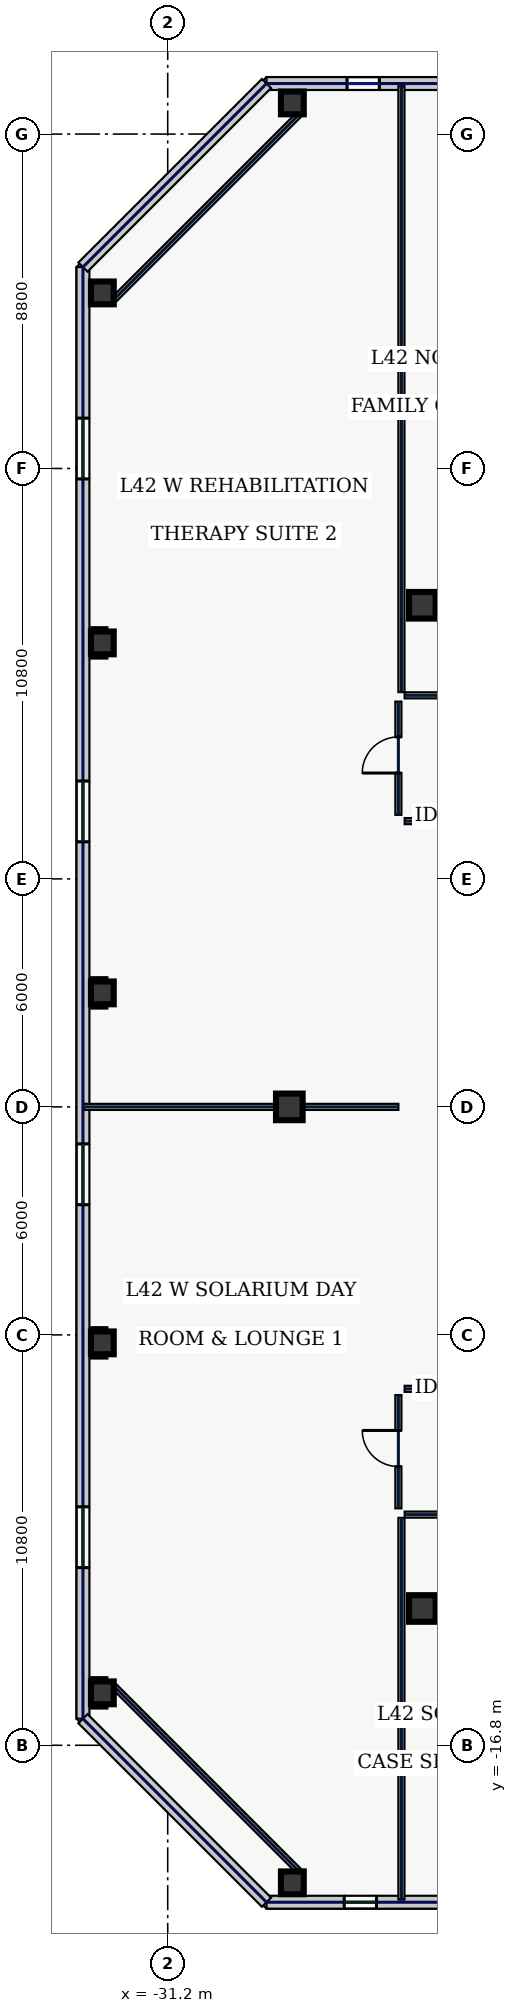
"""IFC4 building model, lengths in metres.
Left out: names, types, materials, properties, quantities, classifications, styles, units other than length and angle.
Written with IfcOpenShell. Run it as: python <this file> out.ifc"""

import sys

from ifc_helpers import new_model, si_unit, direction, frame, frame_2d, origin, origin_2d, place, context, subcontext, project, spatial, rectangle, hollow_rectangle, extrude, element, fill, save


model = new_model("IFC4")
c1 = context("Model", 3, precision=1e-05, world=origin(), true_north=direction((0.0, 1.0)))
c2 = subcontext(c1, "Body", "Model", "MODEL_VIEW")
j1 = project(units=[si_unit("LENGTHUNIT", "METRE"), si_unit("PLANEANGLEUNIT", "RADIAN")], contexts=[c1])
p1 = place(None, origin())
s1 = spatial("IfcSite", under=j1, at=p1, CompositionType="ELEMENT")
p2 = place(p1, origin())
s2 = spatial("IfcBuilding", under=s1, at=p2, CompositionType="ELEMENT")
p3 = place(p2, frame((0.0, 0.0, 184.2)))
s3 = spatial("IfcBuildingStorey", under=s2, at=p3, CompositionType="ELEMENT", Elevation=184.2)
for number, where, z_axis, x_axis in (
    (1, (-24.5, -13.2, 0.0), (0.0, 0.0, 1.0), (1.0, 0.0, 0.0)),
    (2, (-24.5, 13.2, 0.0), (0.0, 0.0, 1.0), (1.0, 0.0, 0.0)),
    (3, (-28.0, 0.0, 0.0), (0.0, 0.0, 1.0), (1.0, 0.0, 0.0)),
):
    element("IfcColumn", number, at=place(p3, frame(where, z_axis=z_axis, x_axis=x_axis)), inside=s3, PredefinedType="COLUMN", context=c2, shape_type="SweptSolid", body=[
        extrude(hollow_rectangle(XDim=0.7, YDim=0.7, WallThickness=0.032, at=origin_2d()), origin(), (0.0, 0.0, 1.0), 3.74),
    ])
for number, where, z_axis, x_axis in (
    (4, (-27.92, -20.42, 0.0), (0.0, 0.0, 1.0), (1.0, 0.0, 0.0)),
    (5, (-27.92, 26.42, 0.0), (0.0, 0.0, 1.0), (1.0, 0.0, 0.0)),
    (6, (-32.92, 21.42, 0.0), (0.0, 0.0, 1.0), (1.0, 0.0, 0.0)),
    (7, (-32.92, 12.21, 0.0), (0.0, 0.0, 1.0), (1.0, 0.0, 0.0)),
    (8, (-32.92, 3.0, 0.0), (0.0, 0.0, 1.0), (1.0, 0.0, 0.0)),
    (9, (-32.92, -6.21, 0.0), (0.0, 0.0, 1.0), (1.0, 0.0, 0.0)),
    (10, (-32.92, -15.42, 0.0), (0.0, 0.0, 1.0), (1.0, 0.0, 0.0)),
):
    element("IfcColumn", number, at=place(p3, frame(where, z_axis=z_axis, x_axis=x_axis)), inside=s3, PredefinedType="COLUMN", context=c2, shape_type="SweptSolid", body=[
        extrude(hollow_rectangle(XDim=0.6, YDim=0.6, WallThickness=0.028, at=origin_2d()), origin(), (0.0, 0.0, 1.0), 3.74),
    ])
p4 = place(p3, frame((-28.6, -20.93, 0.0), z_axis=(0.0, 0.0, 1.0), x_axis=(1.0, 0.0, 0.0)))
e11 = element("IfcWall", 11, at=p4, inside=s3, PredefinedType="STANDARD", context=c2, shape_type="SweptSolid", body=[
    extrude(rectangle(XDim=19.937, YDim=0.34, at=frame_2d((9.969, 0.0))), origin(), (0.0, 0.0, 1.0), 3.74),
])
p5 = place(p4, frame((2.044, 0.0, 0.8)))
e12 = element("IfcOpeningElement", 12, at=p5, cuts=e11, PredefinedType="OPENING", context=c2, shape_type="SweptSolid", body=[
    extrude(rectangle(XDim=0.85, YDim=1.85, at=frame_2d((0.425, 0.925))), frame((0.0, 0.18, 0.0), z_axis=(0.0, -1.0, 0.0), x_axis=(1.0, 0.0, 0.0)), (0.0, 0.0, 1.0), 0.36),
])
p6 = place(p4, frame((6.029, 0.0, 0.8)))
e13 = element("IfcOpeningElement", 13, at=p6, cuts=e11, PredefinedType="OPENING", context=c2, shape_type="SweptSolid", body=[
    extrude(rectangle(XDim=0.85, YDim=1.85, at=frame_2d((0.425, 0.925))), frame((0.0, 0.18, 0.0), z_axis=(0.0, -1.0, 0.0), x_axis=(1.0, 0.0, 0.0)), (0.0, 0.0, 1.0), 0.36),
])
p7 = place(p4, frame((10.707, 0.0, 0.8)))
e14 = element("IfcOpeningElement", 14, at=p7, cuts=e11, PredefinedType="OPENING", context=c2, shape_type="SweptSolid", body=[
    extrude(rectangle(XDim=1.95, YDim=2.1, at=frame_2d((0.975, 1.05))), frame((0.0, 0.18, 0.0), z_axis=(0.0, -1.0, 0.0), x_axis=(1.0, 0.0, 0.0)), (0.0, 0.0, 1.0), 0.36),
])
p8 = place(p4, frame((14.867, 0.0, 0.22)))
e15 = element("IfcOpeningElement", 15, at=p8, cuts=e11, PredefinedType="OPENING", context=c2, shape_type="SweptSolid", body=[
    extrude(rectangle(XDim=1.6, YDim=1.2, at=frame_2d((0.8, 0.6))), frame((0.0, 0.18, 0.0), z_axis=(0.0, -1.0, 0.0), x_axis=(1.0, 0.0, 0.0)), (0.0, 0.0, 1.0), 0.36),
])
p9 = place(p3, frame((-8.663, 26.93, 0.0), z_axis=(0.0, 0.0, 1.0), x_axis=(-1.0, 0.0, 0.0)))
e16 = element("IfcWall", 16, at=p9, inside=s3, PredefinedType="STANDARD", context=c2, shape_type="SweptSolid", body=[
    extrude(rectangle(XDim=19.937, YDim=0.34, at=frame_2d((9.969, 0.0))), origin(), (0.0, 0.0, 1.0), 3.74),
])
p10 = place(p9, frame((16.968, 0.0, 0.7)))
e17 = element("IfcOpeningElement", 17, at=p10, cuts=e16, PredefinedType="OPENING", context=c2, shape_type="SweptSolid", body=[
    extrude(rectangle(XDim=0.85, YDim=1.85, at=frame_2d((0.425, 0.925))), frame((0.0, 0.18, 0.0), z_axis=(0.0, -1.0, 0.0), x_axis=(1.0, 0.0, 0.0)), (0.0, 0.0, 1.0), 0.36),
])
p11 = place(p9, frame((12.983, 0.0, 0.7)))
e18 = element("IfcOpeningElement", 18, at=p11, cuts=e16, PredefinedType="OPENING", context=c2, shape_type="SweptSolid", body=[
    extrude(rectangle(XDim=0.85, YDim=1.85, at=frame_2d((0.425, 0.925))), frame((0.0, 0.18, 0.0), z_axis=(0.0, -1.0, 0.0), x_axis=(1.0, 0.0, 0.0)), (0.0, 0.0, 1.0), 0.36),
])
p12 = place(p9, frame((7.355, 0.0, 0.7)))
e19 = element("IfcOpeningElement", 19, at=p12, cuts=e16, PredefinedType="OPENING", context=c2, shape_type="SweptSolid", body=[
    extrude(rectangle(XDim=1.8, YDim=2.2, at=frame_2d((0.9, 1.1))), frame((0.0, 0.18, 0.0), z_axis=(0.0, -1.0, 0.0), x_axis=(1.0, 0.0, 0.0)), (0.0, 0.0, 1.0), 0.36),
])
p13 = place(p9, frame((3.371, 0.0, 0.7)))
e20 = element("IfcOpeningElement", 20, at=p13, cuts=e16, PredefinedType="OPENING", context=c2, shape_type="SweptSolid", body=[
    extrude(rectangle(XDim=0.85, YDim=1.85, at=frame_2d((0.425, 0.925))), frame((0.0, 0.18, 0.0), z_axis=(0.0, -1.0, 0.0), x_axis=(1.0, 0.0, 0.0)), (0.0, 0.0, 1.0), 0.36),
])
p14 = place(p3, frame((-33.43, 22.1, 0.0), z_axis=(0.0, 0.0, 1.0), x_axis=(0.0, -1.0, 0.0)))
e21 = element("IfcWall", 21, at=p14, inside=s3, PredefinedType="STANDARD", context=c2, shape_type="SweptSolid", body=[
    extrude(rectangle(XDim=38.2, YDim=0.34, at=frame_2d((19.1, 0.0))), origin(), (0.0, 0.0, 1.0), 3.74),
])
p15 = place(p14, frame((3.975, 0.0, 0.58)))
e22 = element("IfcOpeningElement", 22, at=p15, cuts=e21, PredefinedType="OPENING", context=c2, shape_type="SweptSolid", body=[
    extrude(rectangle(XDim=1.6, YDim=2.3, at=frame_2d((0.8, 1.15))), frame((0.0, 0.18, 0.0), z_axis=(0.0, -1.0, 0.0), x_axis=(1.0, 0.0, 0.0)), (0.0, 0.0, 1.0), 0.36),
])
p16 = place(p14, frame((13.525, 0.0, 0.58)))
e23 = element("IfcOpeningElement", 23, at=p16, cuts=e21, PredefinedType="OPENING", context=c2, shape_type="SweptSolid", body=[
    extrude(rectangle(XDim=1.6, YDim=2.3, at=frame_2d((0.8, 1.15))), frame((0.0, 0.18, 0.0), z_axis=(0.0, -1.0, 0.0), x_axis=(1.0, 0.0, 0.0)), (0.0, 0.0, 1.0), 0.36),
])
p17 = place(p14, frame((23.075, 0.0, 0.58)))
e24 = element("IfcOpeningElement", 24, at=p17, cuts=e21, PredefinedType="OPENING", context=c2, shape_type="SweptSolid", body=[
    extrude(rectangle(XDim=1.6, YDim=2.3, at=frame_2d((0.8, 1.15))), frame((0.0, 0.18, 0.0), z_axis=(0.0, -1.0, 0.0), x_axis=(1.0, 0.0, 0.0)), (0.0, 0.0, 1.0), 0.36),
])
p18 = place(p14, frame((32.625, 0.0, 0.58)))
e25 = element("IfcOpeningElement", 25, at=p18, cuts=e21, PredefinedType="OPENING", context=c2, shape_type="SweptSolid", body=[
    extrude(rectangle(XDim=1.6, YDim=2.3, at=frame_2d((0.8, 1.15))), frame((0.0, 0.18, 0.0), z_axis=(0.0, -1.0, 0.0), x_axis=(1.0, 0.0, 0.0)), (0.0, 0.0, 1.0), 0.36),
])
for number, where, z_axis, x_axis in (
    (26, (-28.6, 26.93, 0.0), (0.0, 0.0, 1.0), (-0.707, -0.707, 0.0)),
    (27, (-33.43, -16.1, 0.0), (0.0, 0.0, 1.0), (0.707, -0.707, 0.0)),
):
    element("IfcWall", number, at=place(p3, frame(where, z_axis=z_axis, x_axis=x_axis)), inside=s3, PredefinedType="STANDARD", context=c2, shape_type="SweptSolid", body=[
        extrude(rectangle(XDim=6.83, YDim=0.34, at=frame_2d((3.415, 0.0))), origin(), (0.0, 0.0, 1.0), 3.74),
    ])
for number, where, z_axis, x_axis in (
    (28, (-27.68, 26.18, 0.0), (0.0, 0.0, 1.0), (-0.707, -0.707, 0.0)),
    (29, (-32.68, -15.18, 0.0), (0.0, 0.0, 1.0), (0.707, -0.707, 0.0)),
):
    element("IfcWall", number, at=place(p3, frame(where, z_axis=z_axis, x_axis=x_axis)), inside=s3, PredefinedType="PARTITIONING", context=c2, shape_type="SweptSolid", body=[
        extrude(rectangle(XDim=7.071, YDim=0.16, at=frame_2d((3.536, 0.0))), origin(), (0.0, 0.0, 1.0), 3.74),
    ])
p19 = place(p3, frame((-25.13, -10.565, 0.0), z_axis=(0.0, 0.0, 1.0), x_axis=(0.0, 1.0, 0.0)))
e30 = element("IfcWall", 30, at=p19, inside=s3, PredefinedType="PARTITIONING", context=c2, shape_type="SweptSolid", body=[
    extrude(rectangle(XDim=2.98, YDim=0.16, at=frame_2d((1.49, 0.0))), origin(), (0.0, 0.0, 1.0), 3.74),
])
p20 = place(p19, frame((1.1, 0.0, 0.0)))
e31 = element("IfcOpeningElement", 31, at=p20, cuts=e30, PredefinedType="OPENING", context=c2, shape_type="SweptSolid", body=[
    extrude(rectangle(XDim=0.95, YDim=2.2, at=frame_2d((0.475, 1.1))), frame((0.0, 0.09, 0.0), z_axis=(0.0, -1.0, 0.0), x_axis=(1.0, 0.0, 0.0)), (0.0, 0.0, 1.0), 0.18),
])
for number, where, z_axis, x_axis in (
    (32, (-24.965, -7.42, 0.0), (0.0, 0.0, 1.0), (1.0, 0.0, 0.0)),
    (33, (-10.715, 7.52, 0.0), (0.0, 0.0, 1.0), (-1.0, 0.0, 0.0)),
):
    element("IfcWall", number, at=place(p3, frame(where, z_axis=z_axis, x_axis=x_axis)), inside=s3, PredefinedType="PARTITIONING", context=c2, shape_type="SweptSolid", body=[
        extrude(rectangle(XDim=14.25, YDim=0.16, at=frame_2d((7.125, 0.0))), origin(), (0.0, 0.0, 1.0), 3.74),
    ])
p21 = place(p3, frame((-25.13, 7.685, 0.0), z_axis=(0.0, 0.0, 1.0), x_axis=(0.0, 1.0, 0.0)))
e34 = element("IfcWall", 34, at=p21, inside=s3, PredefinedType="PARTITIONING", context=c2, shape_type="SweptSolid", body=[
    extrude(rectangle(XDim=2.98, YDim=0.16, at=frame_2d((1.49, 0.0))), origin(), (0.0, 0.0, 1.0), 3.74),
])
p22 = place(p21, frame((1.1, 0.0, 0.0)))
e35 = element("IfcOpeningElement", 35, at=p22, cuts=e34, PredefinedType="OPENING", context=c2, shape_type="SweptSolid", body=[
    extrude(rectangle(XDim=0.95, YDim=2.2, at=frame_2d((0.475, 1.1))), frame((0.0, 0.09, 0.0), z_axis=(0.0, -1.0, 0.0), x_axis=(1.0, 0.0, 0.0)), (0.0, 0.0, 1.0), 0.18),
])
p23 = place(p3, frame((-24.965, 10.83, 0.0), z_axis=(0.0, 0.0, 1.0), x_axis=(1.0, 0.0, 0.0)))
e36 = element("IfcWall", 36, at=p23, inside=s3, PredefinedType="PARTITIONING", context=c2, shape_type="SweptSolid", body=[
    extrude(rectangle(XDim=49.93, YDim=0.16, at=frame_2d((24.965, 0.0))), origin(), (0.0, 0.0, 1.0), 3.74),
])
p24 = place(p23, frame((2.044, 0.0, 0.0)))
e37 = element("IfcOpeningElement", 37, at=p24, cuts=e36, PredefinedType="OPENING", context=c2, shape_type="SweptSolid", body=[
    extrude(rectangle(XDim=0.95, YDim=2.2, at=frame_2d((0.475, 1.1))), frame((0.0, 0.09, 0.0), z_axis=(0.0, -1.0, 0.0), x_axis=(1.0, 0.0, 0.0)), (0.0, 0.0, 1.0), 0.18),
])
p25 = place(p23, frame((7.3, 0.0, 0.0)))
e38 = element("IfcOpeningElement", 38, at=p25, cuts=e36, PredefinedType="OPENING", context=c2, shape_type="SweptSolid", body=[
    extrude(rectangle(XDim=1.45, YDim=2.2, at=frame_2d((0.725, 1.1))), frame((0.0, 0.09, 0.0), z_axis=(0.0, -1.0, 0.0), x_axis=(1.0, 0.0, 0.0)), (0.0, 0.0, 1.0), 0.18),
])
p26 = place(p23, frame((13.775, 0.0, 0.0)))
e39 = element("IfcOpeningElement", 39, at=p26, cuts=e36, PredefinedType="OPENING", context=c2, shape_type="SweptSolid", body=[
    extrude(rectangle(XDim=1.3, YDim=2.2, at=frame_2d((0.65, 1.1))), frame((0.0, 0.09, 0.0), z_axis=(0.0, -1.0, 0.0), x_axis=(1.0, 0.0, 0.0)), (0.0, 0.0, 1.0), 0.18),
])
p27 = place(p23, frame((19.85, 0.0, 0.0)))
e40 = element("IfcOpeningElement", 40, at=p27, cuts=e36, PredefinedType="OPENING", context=c2, shape_type="SweptSolid", body=[
    extrude(rectangle(XDim=1.15, YDim=2.2, at=frame_2d((0.575, 1.1))), frame((0.0, 0.09, 0.0), z_axis=(0.0, -1.0, 0.0), x_axis=(1.0, 0.0, 0.0)), (0.0, 0.0, 1.0), 0.18),
])
p28 = place(p23, frame((25.5, 0.0, 0.0)))
e41 = element("IfcOpeningElement", 41, at=p28, cuts=e36, PredefinedType="OPENING", context=c2, shape_type="SweptSolid", body=[
    extrude(rectangle(XDim=0.95, YDim=2.2, at=frame_2d((0.475, 1.1))), frame((0.0, 0.09, 0.0), z_axis=(0.0, -1.0, 0.0), x_axis=(1.0, 0.0, 0.0)), (0.0, 0.0, 1.0), 0.18),
])
p29 = place(p23, frame((30.9, 0.0, 0.0)))
e42 = element("IfcOpeningElement", 42, at=p29, cuts=e36, PredefinedType="OPENING", context=c2, shape_type="SweptSolid", body=[
    extrude(rectangle(XDim=0.95, YDim=2.2, at=frame_2d((0.475, 1.1))), frame((0.0, 0.09, 0.0), z_axis=(0.0, -1.0, 0.0), x_axis=(1.0, 0.0, 0.0)), (0.0, 0.0, 1.0), 0.18),
])
p30 = place(p23, frame((36.395, 0.0, 0.0)))
e43 = element("IfcOpeningElement", 43, at=p30, cuts=e36, PredefinedType="OPENING", context=c2, shape_type="SweptSolid", body=[
    extrude(rectangle(XDim=1.3, YDim=2.2, at=frame_2d((0.65, 1.1))), frame((0.0, 0.09, 0.0), z_axis=(0.0, -1.0, 0.0), x_axis=(1.0, 0.0, 0.0)), (0.0, 0.0, 1.0), 0.18),
])
p31 = place(p23, frame((41.895, 0.0, 0.0)))
e44 = element("IfcOpeningElement", 44, at=p31, cuts=e36, PredefinedType="OPENING", context=c2, shape_type="SweptSolid", body=[
    extrude(rectangle(XDim=1.45, YDim=2.2, at=frame_2d((0.725, 1.1))), frame((0.0, 0.09, 0.0), z_axis=(0.0, -1.0, 0.0), x_axis=(1.0, 0.0, 0.0)), (0.0, 0.0, 1.0), 0.18),
])
p32 = place(p23, frame((46.806, 0.0, 0.0)))
e45 = element("IfcOpeningElement", 45, at=p32, cuts=e36, PredefinedType="OPENING", context=c2, shape_type="SweptSolid", body=[
    extrude(rectangle(XDim=0.95, YDim=2.2, at=frame_2d((0.475, 1.1))), frame((0.0, 0.09, 0.0), z_axis=(0.0, -1.0, 0.0), x_axis=(1.0, 0.0, 0.0)), (0.0, 0.0, 1.0), 0.18),
])
p33 = place(p3, frame((24.965, -10.73, 0.0), z_axis=(0.0, 0.0, 1.0), x_axis=(-1.0, 0.0, 0.0)))
e46 = element("IfcWall", 46, at=p33, inside=s3, PredefinedType="PARTITIONING", context=c2, shape_type="SweptSolid", body=[
    extrude(rectangle(XDim=49.93, YDim=0.16, at=frame_2d((24.965, 0.0))), origin(), (0.0, 0.0, 1.0), 3.74),
])
p34 = place(p33, frame((47.106, 0.0, 0.0)))
e47 = element("IfcOpeningElement", 47, at=p34, cuts=e46, PredefinedType="OPENING", context=c2, shape_type="SweptSolid", body=[
    extrude(rectangle(XDim=0.95, YDim=2.2, at=frame_2d((0.475, 1.1))), frame((0.0, 0.09, 0.0), z_axis=(0.0, -1.0, 0.0), x_axis=(1.0, 0.0, 0.0)), (0.0, 0.0, 1.0), 0.18),
])
p35 = place(p33, frame((40.475, 0.0, 0.0)))
e48 = element("IfcOpeningElement", 48, at=p35, cuts=e46, PredefinedType="OPENING", context=c2, shape_type="SweptSolid", body=[
    extrude(rectangle(XDim=1.15, YDim=2.2, at=frame_2d((0.575, 1.1))), frame((0.0, 0.09, 0.0), z_axis=(0.0, -1.0, 0.0), x_axis=(1.0, 0.0, 0.0)), (0.0, 0.0, 1.0), 0.18),
])
p36 = place(p33, frame((29.1, 0.0, 0.0)))
e49 = element("IfcOpeningElement", 49, at=p36, cuts=e46, PredefinedType="OPENING", context=c2, shape_type="SweptSolid", body=[
    extrude(rectangle(XDim=1.3, YDim=2.2, at=frame_2d((0.65, 1.1))), frame((0.0, 0.09, 0.0), z_axis=(0.0, -1.0, 0.0), x_axis=(1.0, 0.0, 0.0)), (0.0, 0.0, 1.0), 0.18),
])
p37 = place(p33, frame((15.84, 0.0, 0.0)))
e50 = element("IfcOpeningElement", 50, at=p37, cuts=e46, PredefinedType="OPENING", context=c2, shape_type="SweptSolid", body=[
    extrude(rectangle(XDim=1.3, YDim=2.2, at=frame_2d((0.65, 1.1))), frame((0.0, 0.09, 0.0), z_axis=(0.0, -1.0, 0.0), x_axis=(1.0, 0.0, 0.0)), (0.0, 0.0, 1.0), 0.18),
])
p38 = place(p33, frame((6.815, 0.0, 0.0)))
e51 = element("IfcOpeningElement", 51, at=p38, cuts=e46, PredefinedType="OPENING", context=c2, shape_type="SweptSolid", body=[
    extrude(rectangle(XDim=0.95, YDim=2.2, at=frame_2d((0.475, 1.1))), frame((0.0, 0.09, 0.0), z_axis=(0.0, -1.0, 0.0), x_axis=(1.0, 0.0, 0.0)), (0.0, 0.0, 1.0), 0.18),
])
p39 = place(p33, frame((2.044, 0.0, 0.0)))
e52 = element("IfcOpeningElement", 52, at=p39, cuts=e46, PredefinedType="OPENING", context=c2, shape_type="SweptSolid", body=[
    extrude(rectangle(XDim=0.95, YDim=2.2, at=frame_2d((0.475, 1.1))), frame((0.0, 0.09, 0.0), z_axis=(0.0, -1.0, 0.0), x_axis=(1.0, 0.0, 0.0)), (0.0, 0.0, 1.0), 0.18),
])
p40 = place(p3, frame((-25.05, 10.915, 0.0), z_axis=(0.0, 0.0, 1.0), x_axis=(0.0, 1.0, 0.0)))
e53 = element("IfcWall", 53, at=p40, inside=s3, PredefinedType="PARTITIONING", context=c2, shape_type="SweptSolid", body=[
    extrude(rectangle(XDim=15.945, YDim=0.16, at=frame_2d((7.973, 0.0))), origin(), (0.0, 0.0, 1.0), 3.285),
])
p41 = place(p3, frame((-25.05, -20.86, 0.0), z_axis=(0.0, 0.0, 1.0), x_axis=(0.0, 1.0, 0.0)))
e54 = element("IfcWall", 54, at=p41, inside=s3, PredefinedType="PARTITIONING", context=c2, shape_type="SweptSolid", body=[
    extrude(rectangle(XDim=10.045, YDim=0.16, at=frame_2d((5.022, 0.0))), origin(), (0.0, 0.0, 1.0), 3.74),
])
p42 = place(p3, frame((-33.41, 0.0, 0.0), z_axis=(0.0, 0.0, 1.0), x_axis=(1.0, 0.0, 0.0)))
e55 = element("IfcWall", 55, at=p42, inside=s3, PredefinedType="PARTITIONING", context=c2, shape_type="SweptSolid", body=[
    extrude(rectangle(XDim=8.28, YDim=0.16, at=frame_2d((4.14, 0.0))), origin(), (0.0, 0.0, 1.0), 3.74),
])
p43 = place(p5, origin())
e56 = element("IfcWindow", 56, at=p43, inside=s3, PartitioningType="SINGLE_PANEL", PredefinedType="WINDOW", context=c2, shape_type="SweptSolid", body=[
    extrude(rectangle(XDim=0.85, YDim=1.85, at=frame_2d((0.425, 0.925))), frame((0.0, 0.03, 0.0), z_axis=(0.0, -1.0, 0.0), x_axis=(1.0, 0.0, 0.0)), (0.0, 0.0, 1.0), 0.06),
])
fill(e12, e56)
p44 = place(p10, origin())
e57 = element("IfcWindow", 57, at=p44, inside=s3, PartitioningType="SINGLE_PANEL", PredefinedType="WINDOW", context=c2, shape_type="SweptSolid", body=[
    extrude(rectangle(XDim=0.85, YDim=1.85, at=frame_2d((0.425, 0.925))), frame((0.0, 0.03, 0.0), z_axis=(0.0, -1.0, 0.0), x_axis=(1.0, 0.0, 0.0)), (0.0, 0.0, 1.0), 0.06),
])
fill(e17, e57)
p45 = place(p15, origin())
e58 = element("IfcWindow", 58, at=p45, inside=s3, PartitioningType="SINGLE_PANEL", PredefinedType="WINDOW", context=c2, shape_type="SweptSolid", body=[
    extrude(rectangle(XDim=1.6, YDim=2.3, at=frame_2d((0.8, 1.15))), frame((0.0, 0.03, 0.0), z_axis=(0.0, -1.0, 0.0), x_axis=(1.0, 0.0, 0.0)), (0.0, 0.0, 1.0), 0.06),
])
fill(e22, e58)
p46 = place(p16, origin())
e59 = element("IfcWindow", 59, at=p46, inside=s3, PartitioningType="SINGLE_PANEL", PredefinedType="WINDOW", context=c2, shape_type="SweptSolid", body=[
    extrude(rectangle(XDim=1.6, YDim=2.3, at=frame_2d((0.8, 1.15))), frame((0.0, 0.03, 0.0), z_axis=(0.0, -1.0, 0.0), x_axis=(1.0, 0.0, 0.0)), (0.0, 0.0, 1.0), 0.06),
])
fill(e23, e59)
p47 = place(p17, origin())
e60 = element("IfcWindow", 60, at=p47, inside=s3, PartitioningType="SINGLE_PANEL", PredefinedType="WINDOW", context=c2, shape_type="SweptSolid", body=[
    extrude(rectangle(XDim=1.6, YDim=2.3, at=frame_2d((0.8, 1.15))), frame((0.0, 0.03, 0.0), z_axis=(0.0, -1.0, 0.0), x_axis=(1.0, 0.0, 0.0)), (0.0, 0.0, 1.0), 0.06),
])
fill(e24, e60)
p48 = place(p18, origin())
e61 = element("IfcWindow", 61, at=p48, inside=s3, PartitioningType="SINGLE_PANEL", PredefinedType="WINDOW", context=c2, shape_type="SweptSolid", body=[
    extrude(rectangle(XDim=1.6, YDim=2.3, at=frame_2d((0.8, 1.15))), frame((0.0, 0.03, 0.0), z_axis=(0.0, -1.0, 0.0), x_axis=(1.0, 0.0, 0.0)), (0.0, 0.0, 1.0), 0.06),
])
fill(e25, e61)
p49 = place(p20, origin())
e62 = element("IfcDoor", 62, at=p49, inside=s3, OperationType="SINGLE_SWING_RIGHT", PredefinedType="DOOR", context=c2, shape_type="SweptSolid", body=[
    extrude(rectangle(XDim=0.95, YDim=2.2, at=frame_2d((0.475, 1.1))), frame((0.0, 0.025, 0.0), z_axis=(0.0, -1.0, 0.0), x_axis=(1.0, 0.0, 0.0)), (0.0, 0.0, 1.0), 0.05),
])
fill(e31, e62)
p50 = place(p22, origin())
e63 = element("IfcDoor", 63, at=p50, inside=s3, OperationType="SINGLE_SWING_LEFT", PredefinedType="DOOR", context=c2, shape_type="SweptSolid", body=[
    extrude(rectangle(XDim=0.95, YDim=2.2, at=frame_2d((0.475, 1.1))), frame((0.0, 0.025, 0.0), z_axis=(0.0, -1.0, 0.0), x_axis=(1.0, 0.0, 0.0)), (0.0, 0.0, 1.0), 0.05),
])
fill(e35, e63)
save(model, sys.argv[1])
